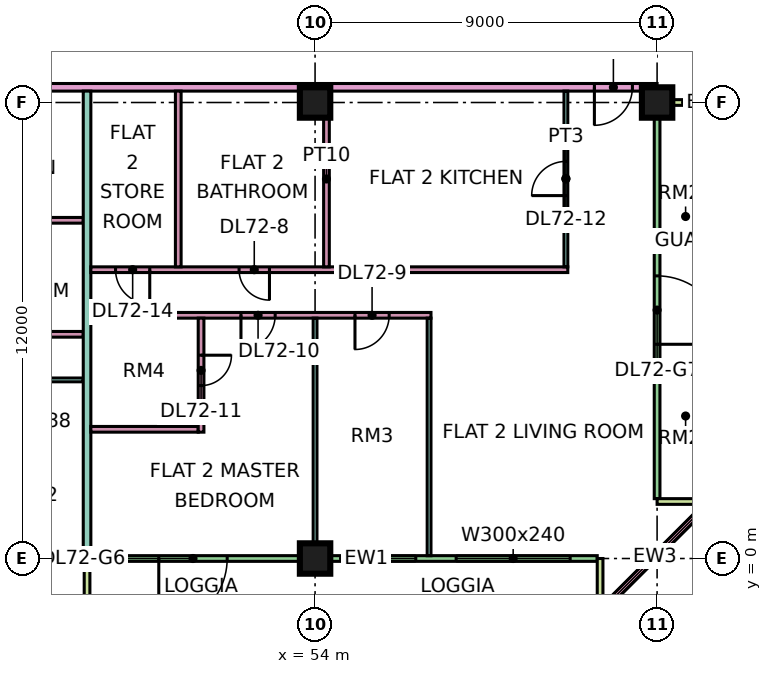
"""IFC4 building model, lengths in metres.
Left out: names, types, materials, properties, quantities, classifications, styles, units other than length and angle.
Written with IfcOpenShell. Run it as: python <this file> out.ifc"""

import sys

from ifc_helpers import new_model, si_unit, direction, frame, frame_2d, origin, origin_2d, place, context, subcontext, project, spatial, rectangle, extrude, element, fill, save


model = new_model("IFC4")
c1 = context("Model", 3, precision=1e-05, world=origin(), true_north=direction((0.0, 1.0)))
c2 = subcontext(c1, "Body", "Model", "MODEL_VIEW")
j1 = project(units=[si_unit("LENGTHUNIT", "METRE"), si_unit("PLANEANGLEUNIT", "RADIAN")], contexts=[c1])
p1 = place(None, origin())
s1 = spatial("IfcSite", under=j1, at=p1, CompositionType="ELEMENT")
p2 = place(p1, origin())
s2 = spatial("IfcBuilding", under=s1, at=p2, CompositionType="ELEMENT")
p3 = place(p2, frame((0.0, 0.0, 307.15)))
s3 = spatial("IfcBuildingStorey", under=s2, at=p3, CompositionType="ELEMENT", Elevation=307.15)
for number, where, z_axis, x_axis in (
    (1, (54.0, 0.0, 0.0), (0.0, 0.0, 1.0), (1.0, 0.0, 0.0)),
    (2, (54.0, 12.0, 0.0), (0.0, 0.0, 1.0), (1.0, 0.0, 0.0)),
    (3, (63.0, 12.0, 0.0), (0.0, 0.0, 1.0), (1.0, 0.0, 0.0)),
):
    element("IfcColumn", number, at=place(p3, frame(where, z_axis=z_axis, x_axis=x_axis)), inside=s3, PredefinedType="COLUMN", context=c2, shape_type="SweptSolid", body=[
        extrude(rectangle(XDim=0.8, YDim=0.8, at=origin_2d()), origin(), (0.0, 0.0, 1.0), 3.75),
    ])
p4 = place(p3, frame((48.075, 0.0, 0.0), z_axis=(0.0, 0.0, 1.0), x_axis=(1.0, 0.0, 0.0)))
e4 = element("IfcWall", 4, at=p4, inside=s3, PredefinedType="SOLIDWALL", context=c2, shape_type="SweptSolid", body=[
    extrude(rectangle(XDim=13.35, YDim=0.15, at=frame_2d((6.675, 0.0))), origin(), (0.0, 0.0, 1.0), 3.35),
])
p5 = place(p4, frame((1.812, 0.0, 0.0)))
e5 = element("IfcOpeningElement", 5, at=p5, cuts=e4, PredefinedType="OPENING", context=c2, shape_type="SweptSolid", body=[
    extrude(rectangle(XDim=1.8, YDim=2.4, at=frame_2d((0.9, 1.2))), frame((0.0, 0.085, 0.0), z_axis=(0.0, -1.0, 0.0), x_axis=(1.0, 0.0, 0.0)), (0.0, 0.0, 1.0), 0.17),
])
p6 = place(p4, frame((6.775, 0.0, 0.45)))
e6 = element("IfcOpeningElement", 6, at=p6, cuts=e4, PredefinedType="OPENING", context=c2, shape_type="SweptSolid", body=[
    extrude(rectangle(XDim=1.8, YDim=2.4, at=frame_2d((0.9, 1.2))), frame((0.0, 0.085, 0.0), z_axis=(0.0, -1.0, 0.0), x_axis=(1.0, 0.0, 0.0)), (0.0, 0.0, 1.0), 0.17),
])
p7 = place(p4, frame((9.637, 0.0, 0.45)))
e7 = element("IfcOpeningElement", 7, at=p7, cuts=e4, PredefinedType="OPENING", context=c2, shape_type="SweptSolid", body=[
    extrude(rectangle(XDim=3.0, YDim=2.4, at=frame_2d((1.5, 1.2))), frame((0.0, 0.085, 0.0), z_axis=(0.0, -1.0, 0.0), x_axis=(1.0, 0.0, 0.0)), (0.0, 0.0, 1.0), 0.17),
])
for number, where, z_axis, x_axis in (
    (8, (48.0, -1.5, 0.0), (0.0, 0.0, 1.0), (0.0, 1.0, 0.0)),
    (9, (61.5, -1.5, 0.0), (0.0, 0.0, 1.0), (0.0, 1.0, 0.0)),
):
    element("IfcWall", number, at=place(p3, frame(where, z_axis=z_axis, x_axis=x_axis)), inside=s3, PredefinedType="SOLIDWALL", context=c2, shape_type="SweptSolid", body=[
        extrude(rectangle(XDim=1.5, YDim=0.15, at=frame_2d((0.75, 0.0))), origin(), (0.0, 0.0, 1.0), 3.35),
    ])
p8 = place(p3, frame((61.447, -1.447, 0.0), z_axis=(0.0, 0.0, 1.0), x_axis=(0.707106781187, 0.707106781187, 0.0)))
e10 = element("IfcWall", 10, at=p8, inside=s3, PredefinedType="SOLIDWALL", context=c2, shape_type="SweptSolid", body=[
    extrude(rectangle(XDim=4.243, YDim=0.15, at=frame_2d((2.121, 0.0))), origin(), (0.0, 0.0, 1.0), 3.35),
])
p9 = place(p8, frame((0.621, 0.0, 0.45)))
e11 = element("IfcOpeningElement", 11, at=p9, cuts=e10, PredefinedType="OPENING", context=c2, shape_type="SweptSolid", body=[
    extrude(rectangle(XDim=3.0, YDim=2.4, at=frame_2d((1.5, 1.2))), frame((0.0, 0.085, 0.0), z_axis=(0.0, -1.0, 0.0), x_axis=(1.0, 0.0, 0.0)), (0.0, 0.0, 1.0), 0.17),
])
p10 = place(p3, frame((63.0, 1.575, 0.0), z_axis=(0.0, 0.0, 1.0), x_axis=(0.0, 1.0, 0.0)))
e12 = element("IfcWall", 12, at=p10, inside=s3, PredefinedType="SOLIDWALL", context=c2, shape_type="SweptSolid", body=[
    extrude(rectangle(XDim=10.35, YDim=0.15, at=frame_2d((5.175, 0.0))), origin(), (0.0, 0.0, 1.0), 3.35),
])
p11 = place(p10, frame((4.062, 0.0, 0.0)))
e13 = element("IfcOpeningElement", 13, at=p11, cuts=e12, PredefinedType="OPENING", context=c2, shape_type="SweptSolid", body=[
    extrude(rectangle(XDim=1.8, YDim=2.4, at=frame_2d((0.9, 1.2))), frame((0.0, 0.085, 0.0), z_axis=(0.0, -1.0, 0.0), x_axis=(1.0, 0.0, 0.0)), (0.0, 0.0, 1.0), 0.17),
])
for number, where, z_axis, x_axis in (
    (14, (64.5, 1.5, 0.0), (0.0, 0.0, 1.0), (-1.0, 0.0, 0.0)),
    (15, (64.5, 12.0, 0.0), (0.0, 0.0, 1.0), (-1.0, 0.0, 0.0)),
):
    element("IfcWall", number, at=place(p3, frame(where, z_axis=z_axis, x_axis=x_axis)), inside=s3, PredefinedType="SOLIDWALL", context=c2, shape_type="SweptSolid", body=[
        extrude(rectangle(XDim=1.5, YDim=0.15, at=frame_2d((0.75, 0.0))), origin(), (0.0, 0.0, 1.0), 3.35),
    ])
p12 = place(p3, frame((33.05, 4.7, 0.0), z_axis=(0.0, 0.0, 1.0), x_axis=(1.0, 0.0, 0.0)))
e16 = element("IfcWall", 16, at=p12, inside=s3, PredefinedType="PARTITIONING", context=c2, shape_type="SweptSolid", body=[
    extrude(rectangle(XDim=14.85, YDim=0.1, at=frame_2d((7.425, 0.0))), origin(), (0.0, 0.0, 1.0), 3.35),
])
p13 = place(p12, frame((1.0, 0.0, 0.0)))
e17 = element("IfcOpeningElement", 17, at=p13, cuts=e16, PredefinedType="OPENING", context=c2, shape_type="SweptSolid", body=[
    extrude(rectangle(XDim=0.9, YDim=2.1, at=frame_2d((0.45, 1.05))), frame((0.0, 0.06, 0.0), z_axis=(0.0, -1.0, 0.0), x_axis=(1.0, 0.0, 0.0)), (0.0, 0.0, 1.0), 0.12),
])
p14 = place(p12, frame((13.0, 0.0, 0.0)))
e18 = element("IfcOpeningElement", 18, at=p14, cuts=e16, PredefinedType="OPENING", context=c2, shape_type="SweptSolid", body=[
    extrude(rectangle(XDim=0.9, YDim=2.1, at=frame_2d((0.45, 1.05))), frame((0.0, 0.06, 0.0), z_axis=(0.0, -1.0, 0.0), x_axis=(1.0, 0.0, 0.0)), (0.0, 0.0, 1.0), 0.12),
])
p15 = place(p12, frame((7.0, 0.0, 0.0)))
e19 = element("IfcOpeningElement", 19, at=p15, cuts=e16, PredefinedType="OPENING", context=c2, shape_type="SweptSolid", body=[
    extrude(rectangle(XDim=0.9, YDim=2.1, at=frame_2d((0.45, 1.05))), frame((0.0, 0.06, 0.0), z_axis=(0.0, -1.0, 0.0), x_axis=(1.0, 0.0, 0.0)), (0.0, 0.0, 1.0), 0.12),
])
p16 = place(p3, frame((40.65, 12.4, 0.0), z_axis=(0.0, 0.0, 1.0), x_axis=(1.0, 0.0, 0.0)))
e20 = element("IfcWall", 20, at=p16, inside=s3, PredefinedType="PARTITIONING", context=c2, shape_type="SweptSolid", body=[
    extrude(rectangle(XDim=22.35, YDim=0.2, at=frame_2d((11.175, 0.0))), origin(), (0.0, 0.0, 1.0), 3.35),
])
p17 = place(p16, frame((20.7, 0.0, 0.0)))
e21 = element("IfcOpeningElement", 21, at=p17, cuts=e20, PredefinedType="OPENING", context=c2, shape_type="SweptSolid", body=[
    extrude(rectangle(XDim=1.0, YDim=2.1, at=frame_2d((0.5, 1.05))), frame((0.0, 0.11, 0.0), z_axis=(0.0, -1.0, 0.0), x_axis=(1.0, 0.0, 0.0)), (0.0, 0.0, 1.0), 0.22),
])
p18 = place(p16, frame((1.05, 0.0, 0.0)))
e22 = element("IfcOpeningElement", 22, at=p18, cuts=e20, PredefinedType="OPENING", context=c2, shape_type="SweptSolid", body=[
    extrude(rectangle(XDim=1.0, YDim=2.1, at=frame_2d((0.5, 1.05))), frame((0.0, 0.11, 0.0), z_axis=(0.0, -1.0, 0.0), x_axis=(1.0, 0.0, 0.0)), (0.0, 0.0, 1.0), 0.22),
])
p19 = place(p3, frame((43.725, 5.9, 0.0), z_axis=(0.0, 0.0, 1.0), x_axis=(1.0, 0.0, 0.0)))
e23 = element("IfcWall", 23, at=p19, inside=s3, PredefinedType="PARTITIONING", context=c2, shape_type="SweptSolid", body=[
    extrude(rectangle(XDim=4.175, YDim=0.15, at=frame_2d((2.087, 0.0))), origin(), (0.0, 0.0, 1.0), 3.35),
])
p20 = place(p19, frame((1.675, 0.0, 0.0)))
e24 = element("IfcOpeningElement", 24, at=p20, cuts=e23, PredefinedType="OPENING", context=c2, shape_type="SweptSolid", body=[
    extrude(rectangle(XDim=0.8, YDim=2.1, at=frame_2d((0.4, 1.05))), frame((0.0, 0.085, 0.0), z_axis=(0.0, -1.0, 0.0), x_axis=(1.0, 0.0, 0.0)), (0.0, 0.0, 1.0), 0.17),
])
p21 = place(p3, frame((43.725, 8.9, 0.0), z_axis=(0.0, 0.0, 1.0), x_axis=(1.0, 0.0, 0.0)))
e25 = element("IfcWall", 25, at=p21, inside=s3, PredefinedType="PARTITIONING", context=c2, shape_type="SweptSolid", body=[
    extrude(rectangle(XDim=4.175, YDim=0.15, at=frame_2d((2.087, 0.0))), origin(), (0.0, 0.0, 1.0), 3.35),
])
p22 = place(p3, frame((48.0, 0.0, 0.0), z_axis=(0.0, 0.0, 1.0), x_axis=(0.0, 1.0, 0.0)))
e26 = element("IfcWall", 26, at=p22, inside=s3, PredefinedType="PARTITIONING", context=c2, shape_type="SweptSolid", body=[
    extrude(rectangle(XDim=12.3, YDim=0.2, at=frame_2d((6.15, 0.0))), origin(), (0.0, 0.0, 1.0), 3.35),
])
p23 = place(p3, frame((48.1, 3.4, 0.0), z_axis=(0.0, 0.0, 1.0), x_axis=(1.0, 0.0, 0.0)))
e27 = element("IfcWall", 27, at=p23, inside=s3, PredefinedType="PARTITIONING", context=c2, shape_type="SweptSolid", body=[
    extrude(rectangle(XDim=2.825, YDim=0.15, at=frame_2d((1.413, 0.0))), origin(), (0.0, 0.0, 1.0), 3.35),
])
p24 = place(p3, frame((48.1, 6.4, 0.0), z_axis=(0.0, 0.0, 1.0), x_axis=(1.0, 0.0, 0.0)))
e28 = element("IfcWall", 28, at=p24, inside=s3, PredefinedType="PARTITIONING", context=c2, shape_type="SweptSolid", body=[
    extrude(rectangle(XDim=8.95, YDim=0.15, at=frame_2d((4.475, 0.0))), origin(), (0.0, 0.0, 1.0), 3.35),
])
p25 = place(p24, frame((6.95, 0.0, 0.0)))
e29 = element("IfcOpeningElement", 29, at=p25, cuts=e28, PredefinedType="OPENING", context=c2, shape_type="SweptSolid", body=[
    extrude(rectangle(XDim=0.9, YDim=2.1, at=frame_2d((0.45, 1.05))), frame((0.0, 0.085, 0.0), z_axis=(0.0, -1.0, 0.0), x_axis=(1.0, 0.0, 0.0)), (0.0, 0.0, 1.0), 0.17),
])
p26 = place(p24, frame((3.95, 0.0, 0.0)))
e30 = element("IfcOpeningElement", 30, at=p26, cuts=e28, PredefinedType="OPENING", context=c2, shape_type="SweptSolid", body=[
    extrude(rectangle(XDim=0.9, YDim=2.1, at=frame_2d((0.45, 1.05))), frame((0.0, 0.085, 0.0), z_axis=(0.0, -1.0, 0.0), x_axis=(1.0, 0.0, 0.0)), (0.0, 0.0, 1.0), 0.17),
])
p27 = place(p3, frame((48.1, 7.6, 0.0), z_axis=(0.0, 0.0, 1.0), x_axis=(1.0, 0.0, 0.0)))
e31 = element("IfcWall", 31, at=p27, inside=s3, PredefinedType="PARTITIONING", context=c2, shape_type="SweptSolid", body=[
    extrude(rectangle(XDim=12.55, YDim=0.15, at=frame_2d((6.275, 0.0))), origin(), (0.0, 0.0, 1.0), 3.35),
])
p28 = place(p27, frame((3.9, 0.0, 0.0)))
e32 = element("IfcOpeningElement", 32, at=p28, cuts=e31, PredefinedType="OPENING", context=c2, shape_type="SweptSolid", body=[
    extrude(rectangle(XDim=0.8, YDim=2.1, at=frame_2d((0.4, 1.05))), frame((0.0, 0.085, 0.0), z_axis=(0.0, -1.0, 0.0), x_axis=(1.0, 0.0, 0.0)), (0.0, 0.0, 1.0), 0.17),
])
p29 = place(p27, frame((0.65, 0.0, 0.0)))
e33 = element("IfcOpeningElement", 33, at=p29, cuts=e31, PredefinedType="OPENING", context=c2, shape_type="SweptSolid", body=[
    extrude(rectangle(XDim=0.9, YDim=2.1, at=frame_2d((0.45, 1.05))), frame((0.0, 0.085, 0.0), z_axis=(0.0, -1.0, 0.0), x_axis=(1.0, 0.0, 0.0)), (0.0, 0.0, 1.0), 0.17),
])
p30 = place(p3, frame((50.4, 7.675, 0.0), z_axis=(0.0, 0.0, 1.0), x_axis=(0.0, 1.0, 0.0)))
e34 = element("IfcWall", 34, at=p30, inside=s3, PredefinedType="PARTITIONING", context=c2, shape_type="SweptSolid", body=[
    extrude(rectangle(XDim=4.625, YDim=0.15, at=frame_2d((2.312, 0.0))), origin(), (0.0, 0.0, 1.0), 3.35),
])
p31 = place(p3, frame((51.0, 3.325, 0.0), z_axis=(0.0, 0.0, 1.0), x_axis=(0.0, 1.0, 0.0)))
e35 = element("IfcWall", 35, at=p31, inside=s3, PredefinedType="PARTITIONING", context=c2, shape_type="SweptSolid", body=[
    extrude(rectangle(XDim=3.0, YDim=0.15, at=frame_2d((1.5, 0.0))), origin(), (0.0, 0.0, 1.0), 3.35),
])
p32 = place(p31, frame((1.225, 0.0, 0.0)))
e36 = element("IfcOpeningElement", 36, at=p32, cuts=e35, PredefinedType="OPENING", context=c2, shape_type="SweptSolid", body=[
    extrude(rectangle(XDim=0.8, YDim=2.1, at=frame_2d((0.4, 1.05))), frame((0.0, 0.085, 0.0), z_axis=(0.0, -1.0, 0.0), x_axis=(1.0, 0.0, 0.0)), (0.0, 0.0, 1.0), 0.17),
])
p33 = place(p3, frame((54.0, 0.074, 0.0), z_axis=(0.0, 0.0, 1.0), x_axis=(0.0, 1.0, 0.0)))
e37 = element("IfcWall", 37, at=p33, inside=s3, PredefinedType="PARTITIONING", context=c2, shape_type="SweptSolid", body=[
    extrude(rectangle(XDim=6.251, YDim=0.1, at=frame_2d((3.125, 0.0))), origin(), (0.0, 0.0, 1.0), 3.35),
])
p34 = place(p3, frame((54.3, 7.675, 0.0), z_axis=(0.0, 0.0, 1.0), x_axis=(0.0, 1.0, 0.0)))
e38 = element("IfcWall", 38, at=p34, inside=s3, PredefinedType="PARTITIONING", context=c2, shape_type="SweptSolid", body=[
    extrude(rectangle(XDim=4.625, YDim=0.15, at=frame_2d((2.312, 0.0))), origin(), (0.0, 0.0, 1.0), 3.35),
])
p35 = place(p3, frame((57.0, 0.074, 0.0), z_axis=(0.0, 0.0, 1.0), x_axis=(0.0, 1.0, 0.0)))
e39 = element("IfcWall", 39, at=p35, inside=s3, PredefinedType="PARTITIONING", context=c2, shape_type="SweptSolid", body=[
    extrude(rectangle(XDim=6.251, YDim=0.1, at=frame_2d((3.125, 0.0))), origin(), (0.0, 0.0, 1.0), 3.35),
])
p36 = place(p3, frame((60.6, 7.675, 0.0), z_axis=(0.0, 0.0, 1.0), x_axis=(0.0, 1.0, 0.0)))
e40 = element("IfcWall", 40, at=p36, inside=s3, PredefinedType="PARTITIONING", context=c2, shape_type="SweptSolid", body=[
    extrude(rectangle(XDim=4.625, YDim=0.1, at=frame_2d((2.312, 0.0))), origin(), (0.0, 0.0, 1.0), 3.35),
])
p37 = place(p36, frame((1.875, 0.0, 0.0)))
e41 = element("IfcOpeningElement", 41, at=p37, cuts=e40, PredefinedType="OPENING", context=c2, shape_type="SweptSolid", body=[
    extrude(rectangle(XDim=0.9, YDim=2.1, at=frame_2d((0.45, 1.05))), frame((0.0, 0.06, 0.0), z_axis=(0.0, -1.0, 0.0), x_axis=(1.0, 0.0, 0.0)), (0.0, 0.0, 1.0), 0.12),
])
p38 = place(p5, frame((1.8, 0.0, 0.0), z_axis=(0.0, 0.0, 1.0), x_axis=(-1.0, 0.0, 0.0)))
e42 = element("IfcDoor", 42, at=p38, inside=s3, OperationType="DOUBLE_DOOR_SINGLE_SWING", PredefinedType="DOOR", context=c2, shape_type="SweptSolid", body=[
    extrude(rectangle(XDim=1.8, YDim=2.4, at=frame_2d((0.9, 1.2))), frame((0.0, 0.025, 0.0), z_axis=(0.0, -1.0, 0.0), x_axis=(1.0, 0.0, 0.0)), (0.0, 0.0, 1.0), 0.05),
])
fill(e5, e42)
p39 = place(p6, origin())
e43 = element("IfcWindow", 43, at=p39, inside=s3, PartitioningType="SINGLE_PANEL", PredefinedType="WINDOW", context=c2, shape_type="SweptSolid", body=[
    extrude(rectangle(XDim=1.8, YDim=2.4, at=frame_2d((0.9, 1.2))), frame((0.0, 0.03, 0.0), z_axis=(0.0, -1.0, 0.0), x_axis=(1.0, 0.0, 0.0)), (0.0, 0.0, 1.0), 0.06),
])
fill(e6, e43)
p40 = place(p7, origin())
e44 = element("IfcWindow", 44, at=p40, inside=s3, PartitioningType="SINGLE_PANEL", PredefinedType="WINDOW", context=c2, shape_type="SweptSolid", body=[
    extrude(rectangle(XDim=3.0, YDim=2.4, at=frame_2d((1.5, 1.2))), frame((0.0, 0.03, 0.0), z_axis=(0.0, -1.0, 0.0), x_axis=(1.0, 0.0, 0.0)), (0.0, 0.0, 1.0), 0.06),
])
fill(e7, e44)
p41 = place(p9, origin())
e45 = element("IfcWindow", 45, at=p41, inside=s3, PartitioningType="SINGLE_PANEL", PredefinedType="WINDOW", context=c2, shape_type="SweptSolid", body=[
    extrude(rectangle(XDim=3.0, YDim=2.4, at=frame_2d((1.5, 1.2))), frame((0.0, 0.03, 0.0), z_axis=(0.0, -1.0, 0.0), x_axis=(1.0, 0.0, 0.0)), (0.0, 0.0, 1.0), 0.06),
])
fill(e11, e45)
p42 = place(p11, frame((1.8, 0.0, 0.0), z_axis=(0.0, 0.0, 1.0), x_axis=(-1.0, 0.0, 0.0)))
e46 = element("IfcDoor", 46, at=p42, inside=s3, OperationType="DOUBLE_DOOR_SINGLE_SWING", PredefinedType="DOOR", context=c2, shape_type="SweptSolid", body=[
    extrude(rectangle(XDim=1.8, YDim=2.4, at=frame_2d((0.9, 1.2))), frame((0.0, 0.025, 0.0), z_axis=(0.0, -1.0, 0.0), x_axis=(1.0, 0.0, 0.0)), (0.0, 0.0, 1.0), 0.05),
])
fill(e13, e46)
p43 = place(p28, origin())
e47 = element("IfcDoor", 47, at=p43, inside=s3, OperationType="SINGLE_SWING_RIGHT", PredefinedType="DOOR", context=c2, shape_type="SweptSolid", body=[
    extrude(rectangle(XDim=0.8, YDim=2.1, at=frame_2d((0.4, 1.05))), frame((0.0, 0.025, 0.0), z_axis=(0.0, -1.0, 0.0), x_axis=(1.0, 0.0, 0.0)), (0.0, 0.0, 1.0), 0.05),
])
fill(e32, e47)
p44 = place(p25, frame((0.9, 0.0, 0.0), z_axis=(0.0, 0.0, 1.0), x_axis=(-1.0, 0.0, 0.0)))
e48 = element("IfcDoor", 48, at=p44, inside=s3, OperationType="SINGLE_SWING_LEFT", PredefinedType="DOOR", context=c2, shape_type="SweptSolid", body=[
    extrude(rectangle(XDim=0.9, YDim=2.1, at=frame_2d((0.45, 1.05))), frame((0.0, 0.025, 0.0), z_axis=(0.0, -1.0, 0.0), x_axis=(1.0, 0.0, 0.0)), (0.0, 0.0, 1.0), 0.05),
])
fill(e29, e48)
p45 = place(p26, frame((0.9, 0.0, 0.0), z_axis=(0.0, 0.0, 1.0), x_axis=(-1.0, 0.0, 0.0)))
e49 = element("IfcDoor", 49, at=p45, inside=s3, OperationType="SINGLE_SWING_LEFT", PredefinedType="DOOR", context=c2, shape_type="SweptSolid", body=[
    extrude(rectangle(XDim=0.9, YDim=2.1, at=frame_2d((0.45, 1.05))), frame((0.0, 0.025, 0.0), z_axis=(0.0, -1.0, 0.0), x_axis=(1.0, 0.0, 0.0)), (0.0, 0.0, 1.0), 0.05),
])
fill(e30, e49)
p46 = place(p32, origin())
e50 = element("IfcDoor", 50, at=p46, inside=s3, OperationType="SINGLE_SWING_RIGHT", PredefinedType="DOOR", context=c2, shape_type="SweptSolid", body=[
    extrude(rectangle(XDim=0.8, YDim=2.1, at=frame_2d((0.4, 1.05))), frame((0.0, 0.025, 0.0), z_axis=(0.0, -1.0, 0.0), x_axis=(1.0, 0.0, 0.0)), (0.0, 0.0, 1.0), 0.05),
])
fill(e36, e50)
p47 = place(p37, origin())
e51 = element("IfcDoor", 51, at=p47, inside=s3, OperationType="SINGLE_SWING_LEFT", PredefinedType="DOOR", context=c2, shape_type="SweptSolid", body=[
    extrude(rectangle(XDim=0.9, YDim=2.1, at=frame_2d((0.45, 1.05))), frame((0.0, 0.025, 0.0), z_axis=(0.0, -1.0, 0.0), x_axis=(1.0, 0.0, 0.0)), (0.0, 0.0, 1.0), 0.05),
])
fill(e41, e51)
p48 = place(p17, frame((1.0, 0.0, 0.0), z_axis=(0.0, 0.0, 1.0), x_axis=(-1.0, 0.0, 0.0)))
e52 = element("IfcDoor", 52, at=p48, inside=s3, OperationType="SINGLE_SWING_LEFT", PredefinedType="DOOR", context=c2, shape_type="SweptSolid", body=[
    extrude(rectangle(XDim=1.0, YDim=2.1, at=frame_2d((0.5, 1.05))), frame((0.0, 0.025, 0.0), z_axis=(0.0, -1.0, 0.0), x_axis=(1.0, 0.0, 0.0)), (0.0, 0.0, 1.0), 0.05),
])
fill(e21, e52)
p49 = place(p29, origin())
e53 = element("IfcDoor", 53, at=p49, inside=s3, OperationType="SINGLE_SWING_RIGHT", PredefinedType="DOOR", context=c2, shape_type="SweptSolid", body=[
    extrude(rectangle(XDim=0.9, YDim=2.1, at=frame_2d((0.45, 1.05))), frame((0.0, 0.025, 0.0), z_axis=(0.0, -1.0, 0.0), x_axis=(1.0, 0.0, 0.0)), (0.0, 0.0, 1.0), 0.05),
])
fill(e33, e53)
save(model, sys.argv[1])
